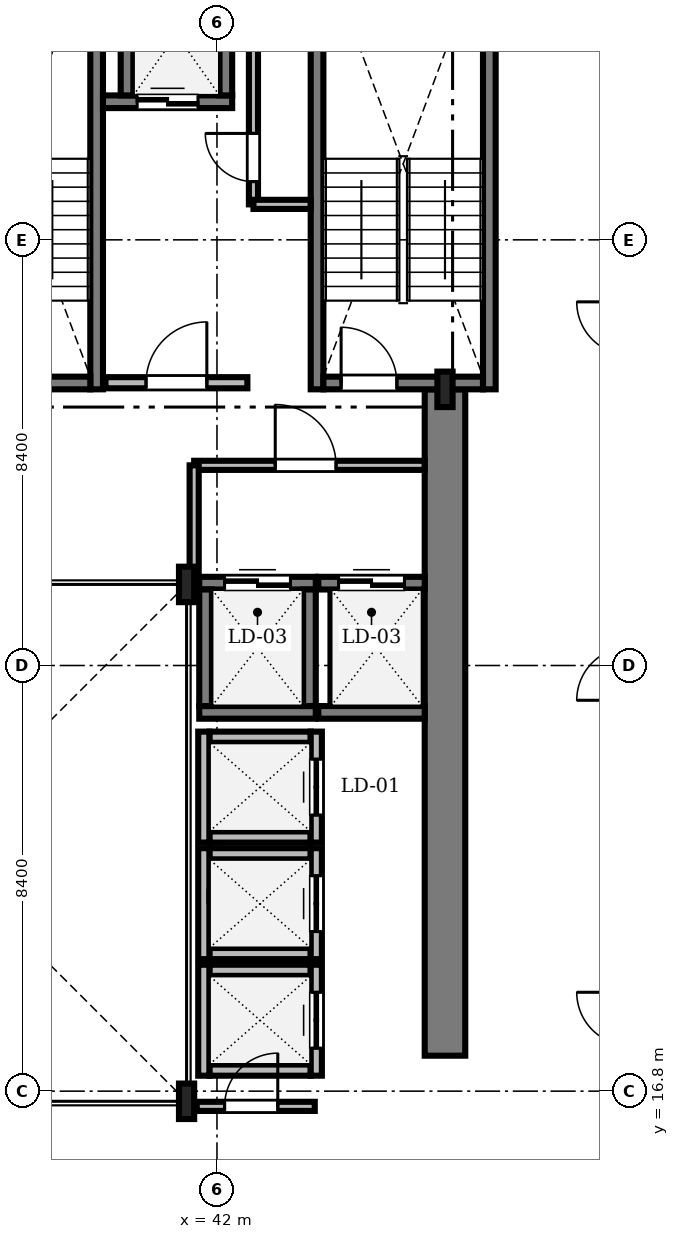
"""IFC4 building model, lengths in metres.
Left out: names, types, materials, properties, quantities, classifications, styles, units other than length and angle.
Written with IfcOpenShell. Run it as: python <this file> out.ifc"""

import sys

from ifc_helpers import new_model, si_unit, direction, frame, frame_2d, origin, origin_2d, place, context, subcontext, project, spatial, rectangle, i_section, extrude, source, transform, mapped, element, fill, save


model = new_model("IFC4")
c1 = context("Model", 3, precision=1e-05, world=origin(), true_north=direction((0.0, 1.0)))
c2 = subcontext(c1, "Body", "Model", "MODEL_VIEW")
j1 = project(units=[si_unit("LENGTHUNIT", "METRE"), si_unit("PLANEANGLEUNIT", "RADIAN")], contexts=[c1])
p1 = place(None, origin())
s1 = spatial("IfcSite", under=j1, at=p1, CompositionType="ELEMENT")
p2 = place(p1, origin())
s2 = spatial("IfcBuilding", under=s1, at=p2, CompositionType="ELEMENT")
p3 = place(p2, frame((0.0, 0.0, 226.05)))
s3 = spatial("IfcBuildingStorey", under=s2, at=p3, CompositionType="ELEMENT", Elevation=226.05)
m1 = source(origin(), c2, "Body", "SweptSolid", [
    extrude(rectangle(XDim=13.15, YDim=0.8, at=frame_2d((6.575, 0.0))), origin(), (0.0, 0.0, 1.0), 3.53),
])
p4 = place(p3, frame((46.5, 17.5, 0.0), z_axis=(0.0, 0.0, 1.0), x_axis=(0.0, 1.0, 0.0)))
e1 = element("IfcWall", 1, at=p4, inside=s3, PredefinedType="SHEAR", context=c2, shape_type="MappedRepresentation", body=[
    mapped(m1, transform((0.0, 0.0, 0.0), scale=1.0)),
])
m2 = source(origin(), c2, "Body", "SweptSolid", [
    extrude(i_section(OverallWidth=0.3, OverallDepth=0.7, WebThickness=0.017, FlangeThickness=0.032, FilletRadius=0.027, at=origin_2d()), origin(), (0.0, 0.0, 1.0), 3.53),
])
for number, where, z_axis, x_axis in (
    (2, (41.4, 16.6, 0.0), (0.0, 0.0, 1.0), (1.0, 0.0, 0.0)),
    (3, (41.4, 26.8, 0.0), (0.0, 0.0, 1.0), (1.0, 0.0, 0.0)),
    (4, (46.5, 30.65, 0.0), (0.0, 0.0, 1.0), (1.0, 0.0, 0.0)),
):
    element("IfcColumn", number, at=place(p3, frame(where, z_axis=z_axis, x_axis=x_axis)), inside=s3, PredefinedType="COLUMN", context=c2, shape_type="MappedRepresentation", body=[
        mapped(m2, transform((0.0, 0.0, 0.0), scale=1.0)),
    ])
m3 = source(origin(), c2, "Body", "SweptSolid", [
    extrude(rectangle(XDim=9.25, YDim=0.25, at=frame_2d((4.625, 0.0))), origin(), (0.0, 0.0, 1.0), 3.55),
])
p5 = place(p3, frame((39.625, 30.65, 0.0), z_axis=(0.0, 0.0, 1.0), x_axis=(0.0, 1.0, 0.0)))
e5 = element("IfcWall", 5, at=p5, inside=s3, PredefinedType="SOLIDWALL", context=c2, shape_type="MappedRepresentation", body=[
    mapped(m3, transform((0.0, 0.0, 0.0), scale=1.0)),
])
m4 = source(origin(), c2, "Body", "SweptSolid", [
    extrude(rectangle(XDim=3.15, YDim=0.25, at=frame_2d((1.575, 0.0))), origin(), (0.0, 0.0, 1.0), 3.55),
])
p6 = place(p3, frame((36.35, 30.775, 0.0), z_axis=(0.0, 0.0, 1.0), x_axis=(1.0, 0.0, 0.0)))
e6 = element("IfcWall", 6, at=p6, inside=s3, PredefinedType="SOLIDWALL", context=c2, shape_type="MappedRepresentation", body=[
    mapped(m4, transform((0.0, 0.0, 0.0), scale=1.0)),
])
m5 = source(origin(), c2, "Body", "SweptSolid", [
    extrude(rectangle(XDim=1.1, YDim=2.2, at=frame_2d((0.55, 1.1))), frame((0.0, 0.135, 0.0), z_axis=(0.0, -1.0, 0.0), x_axis=(1.0, 0.0, 0.0)), (0.0, 0.0, 1.0), 0.27),
])
p7 = place(p6, frame((0.35, 0.0, 0.0)))
e7 = element("IfcOpeningElement", 7, at=p7, cuts=e6, PredefinedType="OPENING", context=c2, shape_type="MappedRepresentation", body=[
    mapped(m5, transform((0.0, 0.0, 0.0), scale=1.0)),
])
for number, where, z_axis, x_axis in (
    (8, (43.975, 30.65, 0.0), (0.0, 0.0, 1.0), (0.0, 1.0, 0.0)),
    (9, (47.375, 30.65, 0.0), (0.0, 0.0, 1.0), (0.0, 1.0, 0.0)),
):
    element("IfcWall", number, at=place(p3, frame(where, z_axis=z_axis, x_axis=x_axis)), inside=s3, PredefinedType="SOLIDWALL", context=c2, shape_type="MappedRepresentation", body=[
        mapped(m3, transform((0.0, 0.0, 0.0), scale=1.0)),
    ])
p8 = place(p3, frame((44.1, 30.775, 0.0), z_axis=(0.0, 0.0, 1.0), x_axis=(1.0, 0.0, 0.0)))
e10 = element("IfcWall", 10, at=p8, inside=s3, PredefinedType="SOLIDWALL", context=c2, shape_type="MappedRepresentation", body=[
    mapped(m4, transform((0.0, 0.0, 0.0), scale=1.0)),
])
p9 = place(p8, frame((0.35, 0.0, 0.0)))
e11 = element("IfcOpeningElement", 11, at=p9, cuts=e10, PredefinedType="OPENING", context=c2, shape_type="MappedRepresentation", body=[
    mapped(m5, transform((0.0, 0.0, 0.0), scale=1.0)),
])
m6 = source(origin(), c2, "Body", "SweptSolid", [
    extrude(rectangle(XDim=2.8, YDim=0.22, at=frame_2d((1.4, 0.0))), origin(), (0.0, 0.0, 1.0), 3.53),
])
p10 = place(p3, frame((39.8, 30.78, 0.0), z_axis=(0.0, 0.0, 1.0), x_axis=(1.0, 0.0, 0.0)))
e12 = element("IfcWall", 12, at=p10, inside=s3, PredefinedType="SOLIDWALL", context=c2, shape_type="MappedRepresentation", body=[
    mapped(m6, transform((0.0, 0.0, 0.0), scale=1.0)),
])
m7 = source(origin(), c2, "Body", "SweptSolid", [
    extrude(rectangle(XDim=1.2, YDim=2.2, at=frame_2d((0.6, 1.1))), frame((0.0, 0.12, 0.0), z_axis=(0.0, -1.0, 0.0), x_axis=(1.0, 0.0, 0.0)), (0.0, 0.0, 1.0), 0.24),
])
p11 = place(p10, frame((0.8, 0.0, 0.0)))
e13 = element("IfcOpeningElement", 13, at=p11, cuts=e12, PredefinedType="OPENING", context=c2, shape_type="MappedRepresentation", body=[
    mapped(m7, transform((0.0, 0.0, 0.0), scale=1.0)),
])
m8 = source(origin(), c2, "Body", "SweptSolid", [
    extrude(rectangle(XDim=2.55, YDim=0.25, at=frame_2d((1.275, 0.0))), origin(), (0.0, 0.0, 1.0), 3.53),
])
p12 = place(p3, frame((39.75, 36.325, 0.0), z_axis=(0.0, 0.0, 1.0), x_axis=(1.0, 0.0, 0.0)))
e14 = element("IfcWall", 14, at=p12, inside=s3, PredefinedType="SOLIDWALL", context=c2, shape_type="MappedRepresentation", body=[
    mapped(m8, transform((0.0, 0.0, 0.0), scale=1.0)),
])
m9 = source(origin(), c2, "Body", "SweptSolid", [
    extrude(rectangle(XDim=1.2, YDim=2.25, at=frame_2d((0.6, 1.125))), frame((0.0, 0.135, 0.0), z_axis=(0.0, -1.0, 0.0), x_axis=(1.0, 0.0, 0.0)), (0.0, 0.0, 1.0), 0.27),
])
p13 = place(p12, frame((0.675, 0.0, 0.0)))
e15 = element("IfcOpeningElement", 15, at=p13, cuts=e14, PredefinedType="OPENING", context=c2, shape_type="MappedRepresentation", body=[
    mapped(m9, transform((0.0, 0.0, 0.0), scale=1.0)),
])
m10 = source(origin(), c2, "Body", "SweptSolid", [
    extrude(rectangle(XDim=2.4, YDim=0.25, at=frame_2d((1.2, 0.0))), origin(), (0.0, 0.0, 1.0), 3.53),
])
for number, where, z_axis, x_axis in (
    (16, (40.225, 36.45, 0.0), (0.0, 0.0, 1.0), (0.0, 1.0, 0.0)),
    (17, (42.175, 36.45, 0.0), (0.0, 0.0, 1.0), (0.0, 1.0, 0.0)),
):
    element("IfcWall", number, at=place(p3, frame(where, z_axis=z_axis, x_axis=x_axis)), inside=s3, PredefinedType="SOLIDWALL", context=c2, shape_type="MappedRepresentation", body=[
        mapped(m10, transform((0.0, 0.0, 0.0), scale=1.0)),
    ])
m11 = source(origin(), c2, "Body", "SweptSolid", [
    extrude(rectangle(XDim=2.0, YDim=0.22, at=frame_2d((1.0, 0.0))), origin(), (0.0, 0.0, 1.0), 3.53),
])
for number, where, z_axis, x_axis in (
    (18, (41.85, 21.815, 0.0), (0.0, 0.0, 1.0), (1.0, 0.0, 0.0)),
    (19, (41.85, 23.785, 0.0), (0.0, 0.0, 1.0), (1.0, 0.0, 0.0)),
):
    element("IfcWall", number, at=place(p3, frame(where, z_axis=z_axis, x_axis=x_axis)), inside=s3, PredefinedType="SOLIDWALL", context=c2, shape_type="MappedRepresentation", body=[
        mapped(m11, transform((0.0, 0.0, 0.0), scale=1.0)),
    ])
m12 = source(origin(), c2, "Body", "SweptSolid", [
    extrude(rectangle(XDim=2.19, YDim=0.22, at=frame_2d((1.095, 0.0))), origin(), (0.0, 0.0, 1.0), 3.53),
])
p14 = place(p3, frame((41.74, 21.705, 0.0), z_axis=(0.0, 0.0, 1.0), x_axis=(0.0, 1.0, 0.0)))
e20 = element("IfcWall", 20, at=p14, inside=s3, PredefinedType="SOLIDWALL", context=c2, shape_type="MappedRepresentation", body=[
    mapped(m12, transform((0.0, 0.0, 0.0), scale=1.0)),
])
p15 = place(p3, frame((43.96, 21.705, 0.0), z_axis=(0.0, 0.0, 1.0), x_axis=(0.0, 1.0, 0.0)))
e21 = element("IfcWall", 21, at=p15, inside=s3, PredefinedType="SOLIDWALL", context=c2, shape_type="MappedRepresentation", body=[
    mapped(m12, transform((0.0, 0.0, 0.0), scale=1.0)),
])
m13 = source(origin(), c2, "Body", "SweptSolid", [
    extrude(rectangle(XDim=1.1, YDim=2.2, at=frame_2d((0.55, 1.1))), frame((0.0, 0.12, 0.0), z_axis=(0.0, -1.0, 0.0), x_axis=(1.0, 0.0, 0.0)), (0.0, 0.0, 1.0), 0.24),
])
p16 = place(p15, frame((0.545, 0.0, 0.0)))
e22 = element("IfcOpeningElement", 22, at=p16, cuts=e21, PredefinedType="OPENING", context=c2, shape_type="MappedRepresentation", body=[
    mapped(m13, transform((0.0, 0.0, 0.0), scale=1.0)),
])
for number, where, z_axis, x_axis in (
    (23, (41.85, 19.515, 0.0), (0.0, 0.0, 1.0), (1.0, 0.0, 0.0)),
    (24, (41.85, 21.485, 0.0), (0.0, 0.0, 1.0), (1.0, 0.0, 0.0)),
):
    element("IfcWall", number, at=place(p3, frame(where, z_axis=z_axis, x_axis=x_axis)), inside=s3, PredefinedType="SOLIDWALL", context=c2, shape_type="MappedRepresentation", body=[
        mapped(m11, transform((0.0, 0.0, 0.0), scale=1.0)),
    ])
p17 = place(p3, frame((41.74, 19.405, 0.0), z_axis=(0.0, 0.0, 1.0), x_axis=(0.0, 1.0, 0.0)))
e25 = element("IfcWall", 25, at=p17, inside=s3, PredefinedType="SOLIDWALL", context=c2, shape_type="MappedRepresentation", body=[
    mapped(m12, transform((0.0, 0.0, 0.0), scale=1.0)),
])
p18 = place(p3, frame((43.96, 19.405, 0.0), z_axis=(0.0, 0.0, 1.0), x_axis=(0.0, 1.0, 0.0)))
e26 = element("IfcWall", 26, at=p18, inside=s3, PredefinedType="SOLIDWALL", context=c2, shape_type="MappedRepresentation", body=[
    mapped(m12, transform((0.0, 0.0, 0.0), scale=1.0)),
])
p19 = place(p18, frame((0.545, 0.0, 0.0)))
e27 = element("IfcOpeningElement", 27, at=p19, cuts=e26, PredefinedType="OPENING", context=c2, shape_type="MappedRepresentation", body=[
    mapped(m13, transform((0.0, 0.0, 0.0), scale=1.0)),
])
for number, where, z_axis, x_axis in (
    (28, (41.85, 17.215, 0.0), (0.0, 0.0, 1.0), (1.0, 0.0, 0.0)),
    (29, (41.85, 19.185, 0.0), (0.0, 0.0, 1.0), (1.0, 0.0, 0.0)),
):
    element("IfcWall", number, at=place(p3, frame(where, z_axis=z_axis, x_axis=x_axis)), inside=s3, PredefinedType="SOLIDWALL", context=c2, shape_type="MappedRepresentation", body=[
        mapped(m11, transform((0.0, 0.0, 0.0), scale=1.0)),
    ])
p20 = place(p3, frame((41.74, 17.105, 0.0), z_axis=(0.0, 0.0, 1.0), x_axis=(0.0, 1.0, 0.0)))
e30 = element("IfcWall", 30, at=p20, inside=s3, PredefinedType="SOLIDWALL", context=c2, shape_type="MappedRepresentation", body=[
    mapped(m12, transform((0.0, 0.0, 0.0), scale=1.0)),
])
p21 = place(p3, frame((43.96, 17.105, 0.0), z_axis=(0.0, 0.0, 1.0), x_axis=(0.0, 1.0, 0.0)))
e31 = element("IfcWall", 31, at=p21, inside=s3, PredefinedType="SOLIDWALL", context=c2, shape_type="MappedRepresentation", body=[
    mapped(m12, transform((0.0, 0.0, 0.0), scale=1.0)),
])
p22 = place(p21, frame((0.545, 0.0, 0.0)))
e32 = element("IfcOpeningElement", 32, at=p22, cuts=e31, PredefinedType="OPENING", context=c2, shape_type="MappedRepresentation", body=[
    mapped(m13, transform((0.0, 0.0, 0.0), scale=1.0)),
])
m14 = source(origin(), c2, "Body", "SweptSolid", [
    extrude(rectangle(XDim=2.3, YDim=0.25, at=frame_2d((1.15, 0.0))), origin(), (0.0, 0.0, 1.0), 3.53),
])
p23 = place(p3, frame((41.65, 24.275, 0.0), z_axis=(0.0, 0.0, 1.0), x_axis=(1.0, 0.0, 0.0)))
e33 = element("IfcWall", 33, at=p23, inside=s3, PredefinedType="SOLIDWALL", context=c2, shape_type="MappedRepresentation", body=[
    mapped(m14, transform((0.0, 0.0, 0.0), scale=1.0)),
])
p24 = place(p3, frame((41.65, 26.825, 0.0), z_axis=(0.0, 0.0, 1.0), x_axis=(1.0, 0.0, 0.0)))
e34 = element("IfcWall", 34, at=p24, inside=s3, PredefinedType="SOLIDWALL", context=c2, shape_type="MappedRepresentation", body=[
    mapped(m14, transform((0.0, 0.0, 0.0), scale=1.0)),
])
m15 = source(origin(), c2, "Body", "SweptSolid", [
    extrude(rectangle(XDim=1.3, YDim=2.3, at=frame_2d((0.65, 1.15))), frame((0.0, 0.135, 0.0), z_axis=(0.0, -1.0, 0.0), x_axis=(1.0, 0.0, 0.0)), (0.0, 0.0, 1.0), 0.27),
])
p25 = place(p24, frame((0.5, 0.0, 0.0)))
e35 = element("IfcOpeningElement", 35, at=p25, cuts=e34, PredefinedType="OPENING", context=c2, shape_type="MappedRepresentation", body=[
    mapped(m15, transform((0.0, 0.0, 0.0), scale=1.0)),
])
for number, where, z_axis, x_axis in (
    (36, (41.775, 24.4, 0.0), (0.0, 0.0, 1.0), (0.0, 1.0, 0.0)),
    (37, (43.825, 24.4, 0.0), (0.0, 0.0, 1.0), (0.0, 1.0, 0.0)),
):
    element("IfcWall", number, at=place(p3, frame(where, z_axis=z_axis, x_axis=x_axis)), inside=s3, PredefinedType="SOLIDWALL", context=c2, shape_type="MappedRepresentation", body=[
        mapped(m14, transform((0.0, 0.0, 0.0), scale=1.0)),
    ])
m16 = source(origin(), c2, "Body", "SweptSolid", [
    extrude(rectangle(XDim=2.1, YDim=0.25, at=frame_2d((1.05, 0.0))), origin(), (0.0, 0.0, 1.0), 3.53),
])
p26 = place(p3, frame((44.0, 24.275, 0.0), z_axis=(0.0, 0.0, 1.0), x_axis=(1.0, 0.0, 0.0)))
e38 = element("IfcWall", 38, at=p26, inside=s3, PredefinedType="SOLIDWALL", context=c2, shape_type="MappedRepresentation", body=[
    mapped(m16, transform((0.0, 0.0, 0.0), scale=1.0)),
])
p27 = place(p3, frame((44.0, 26.825, 0.0), z_axis=(0.0, 0.0, 1.0), x_axis=(1.0, 0.0, 0.0)))
e39 = element("IfcWall", 39, at=p27, inside=s3, PredefinedType="SOLIDWALL", context=c2, shape_type="MappedRepresentation", body=[
    mapped(m16, transform((0.0, 0.0, 0.0), scale=1.0)),
])
p28 = place(p27, frame((0.4, 0.0, 0.0)))
e40 = element("IfcOpeningElement", 40, at=p28, cuts=e39, PredefinedType="OPENING", context=c2, shape_type="MappedRepresentation", body=[
    mapped(m15, transform((0.0, 0.0, 0.0), scale=1.0)),
])
m17 = source(origin(), c2, "Body", "SweptSolid", [
    extrude(rectangle(XDim=4.95, YDim=0.18, at=frame_2d((2.475, 0.0))), origin(), (0.0, 0.0, 1.0), 3.53),
])
p29 = place(p3, frame((42.72, 34.3, 0.0), z_axis=(0.0, 0.0, 1.0), x_axis=(0.0, 1.0, 0.0)))
e41 = element("IfcWall", 41, at=p29, inside=s3, PredefinedType="PARTITIONING", context=c2, shape_type="MappedRepresentation", body=[
    mapped(m17, transform((0.0, 0.0, 0.0), scale=1.0)),
])
m18 = source(origin(), c2, "Body", "SweptSolid", [
    extrude(rectangle(XDim=0.95, YDim=2.15, at=frame_2d((0.475, 1.075))), frame((0.0, 0.1, 0.0), z_axis=(0.0, -1.0, 0.0), x_axis=(1.0, 0.0, 0.0)), (0.0, 0.0, 1.0), 0.2),
])
p30 = place(p29, frame((0.45, 0.0, 0.0)))
e42 = element("IfcOpeningElement", 42, at=p30, cuts=e41, PredefinedType="OPENING", context=c2, shape_type="MappedRepresentation", body=[
    mapped(m18, transform((0.0, 0.0, 0.0), scale=1.0)),
])
m19 = source(origin(), c2, "Body", "SweptSolid", [
    extrude(rectangle(XDim=4.548, YDim=0.18, at=frame_2d((2.274, 0.0))), origin(), (0.0, 0.0, 1.0), 3.162),
])
p31 = place(p3, frame((41.55, 29.15, 0.0), z_axis=(0.0, 0.0, 1.0), x_axis=(1.0, 0.0, 0.0)))
e43 = element("IfcWall", 43, at=p31, inside=s3, PredefinedType="PARTITIONING", context=c2, shape_type="MappedRepresentation", body=[
    mapped(m19, transform((0.0, 0.0, 0.0), scale=1.0)),
])
m20 = source(origin(), c2, "Body", "SweptSolid", [
    extrude(rectangle(XDim=1.2, YDim=2.2, at=frame_2d((0.6, 1.1))), frame((0.0, 0.1, 0.0), z_axis=(0.0, -1.0, 0.0), x_axis=(1.0, 0.0, 0.0)), (0.0, 0.0, 1.0), 0.2),
])
p32 = place(p31, frame((1.6, 0.0, 0.0)))
e44 = element("IfcOpeningElement", 44, at=p32, cuts=e43, PredefinedType="OPENING", context=c2, shape_type="MappedRepresentation", body=[
    mapped(m20, transform((0.0, 0.0, 0.0), scale=1.0)),
])
m21 = source(origin(), c2, "Body", "SweptSolid", [
    extrude(rectangle(XDim=2.33, YDim=0.18, at=frame_2d((1.165, 0.0))), origin(), (0.0, 0.0, 1.0), 2.972),
])
p33 = place(p3, frame((41.6, 16.5, 0.0), z_axis=(0.0, 0.0, 1.0), x_axis=(1.0, 0.0, 0.0)))
e45 = element("IfcWall", 45, at=p33, inside=s3, PredefinedType="PARTITIONING", context=c2, shape_type="MappedRepresentation", body=[
    mapped(m21, transform((0.0, 0.0, 0.0), scale=1.0)),
])
m22 = source(origin(), c2, "Body", "SweptSolid", [
    extrude(rectangle(XDim=1.05, YDim=2.2, at=frame_2d((0.525, 1.1))), frame((0.0, 0.1, 0.0), z_axis=(0.0, -1.0, 0.0), x_axis=(1.0, 0.0, 0.0)), (0.0, 0.0, 1.0), 0.2),
])
p34 = place(p33, frame((0.55, 0.0, 0.0)))
e46 = element("IfcOpeningElement", 46, at=p34, cuts=e45, PredefinedType="OPENING", context=c2, shape_type="MappedRepresentation", body=[
    mapped(m22, transform((0.0, 0.0, 0.0), scale=1.0)),
])
m23 = source(origin(), c2, "Body", "SweptSolid", [
    extrude(rectangle(XDim=2.35, YDim=0.18, at=frame_2d((1.175, 0.0))), origin(), (0.0, 0.0, 1.0), 2.972),
])
p35 = place(p3, frame((41.55, 26.8, 0.0), z_axis=(0.0, 0.0, 1.0), x_axis=(0.0, 1.0, 0.0)))
e47 = element("IfcWall", 47, at=p35, inside=s3, PredefinedType="PARTITIONING", context=c2, shape_type="MappedRepresentation", body=[
    mapped(m23, transform((0.0, 0.0, 0.0), scale=1.0)),
])
m24 = source(origin(), c2, "Body", "SweptSolid", [
    extrude(rectangle(XDim=1.858, YDim=0.18, at=frame_2d((0.929, 0.0))), origin(), (0.0, 0.0, 1.0), 3.53),
])
p36 = place(p3, frame((41.852, 20.65, 0.0), z_axis=(0.0, 0.0, 1.0), x_axis=(1.0, 0.0, 0.0)))
e48 = element("IfcWall", 48, at=p36, inside=s3, PredefinedType="PARTITIONING", context=c2, shape_type="MappedRepresentation", body=[
    mapped(m24, transform((0.0, 0.0, 0.0), scale=1.0)),
])
m25 = source(origin(), c2, "Body", "SweptSolid", [
    extrude(rectangle(XDim=1.128, YDim=0.18, at=frame_2d((0.564, 0.0))), origin(), (0.0, 0.0, 1.0), 3.53),
])
p37 = place(p3, frame((42.72, 34.3, 0.0), z_axis=(0.0, 0.0, 1.0), x_axis=(1.0, 0.0, 0.0)))
e49 = element("IfcWall", 49, at=p37, inside=s3, PredefinedType="PARTITIONING", context=c2, shape_type="MappedRepresentation", body=[
    mapped(m25, transform((0.0, 0.0, 0.0), scale=1.0)),
])
m26 = source(origin(), c2, "Body", "SweptSolid", [
    extrude(rectangle(XDim=1.1, YDim=2.2, at=frame_2d((0.55, 1.1))), frame((0.0, 0.025, 0.0), z_axis=(0.0, -1.0, 0.0), x_axis=(1.0, 0.0, 0.0)), (0.0, 0.0, 1.0), 0.05),
])
p38 = place(p9, origin())
e50 = element("IfcDoor", 50, at=p38, inside=s3, OperationType="SINGLE_SWING_LEFT", PredefinedType="DOOR", context=c2, shape_type="MappedRepresentation", body=[
    mapped(m26, transform((0.0, 0.0, 0.0), scale=1.0)),
])
fill(e11, e50)
m27 = source(origin(), c2, "Body", "SweptSolid", [
    extrude(rectangle(XDim=1.2, YDim=2.2, at=frame_2d((0.6, 1.1))), frame((0.0, 0.025, 0.0), z_axis=(0.0, -1.0, 0.0), x_axis=(1.0, 0.0, 0.0)), (0.0, 0.0, 1.0), 0.05),
])
p39 = place(p11, origin())
e51 = element("IfcDoor", 51, at=p39, inside=s3, OperationType="SINGLE_SWING_RIGHT", PredefinedType="DOOR", context=c2, shape_type="MappedRepresentation", body=[
    mapped(m27, transform((0.0, 0.0, 0.0), scale=1.0)),
])
fill(e13, e51)
m28 = source(origin(), c2, "Body", "SweptSolid", [
    extrude(rectangle(XDim=1.2, YDim=2.25, at=frame_2d((0.6, 1.125))), frame((0.0, 0.025, 0.0), z_axis=(0.0, -1.0, 0.0), x_axis=(1.0, 0.0, 0.0)), (0.0, 0.0, 1.0), 0.05),
])
p40 = place(p13, origin())
e52 = element("IfcDoor", 52, at=p40, inside=s3, OperationType="DOUBLE_DOOR_SLIDING", PredefinedType="DOOR", context=c2, shape_type="MappedRepresentation", body=[
    mapped(m28, transform((0.0, 0.0, 0.0), scale=1.0)),
])
fill(e15, e52)
p41 = place(p16, origin())
e53 = element("IfcDoor", 53, at=p41, inside=s3, OperationType="DOUBLE_DOOR_SLIDING", PredefinedType="DOOR", context=c2, shape_type="MappedRepresentation", body=[
    mapped(m26, transform((0.0, 0.0, 0.0), scale=1.0)),
])
fill(e22, e53)
p42 = place(p19, origin())
e54 = element("IfcDoor", 54, at=p42, inside=s3, OperationType="DOUBLE_DOOR_SLIDING", PredefinedType="DOOR", context=c2, shape_type="MappedRepresentation", body=[
    mapped(m26, transform((0.0, 0.0, 0.0), scale=1.0)),
])
fill(e27, e54)
p43 = place(p22, origin())
e55 = element("IfcDoor", 55, at=p43, inside=s3, OperationType="DOUBLE_DOOR_SLIDING", PredefinedType="DOOR", context=c2, shape_type="MappedRepresentation", body=[
    mapped(m26, transform((0.0, 0.0, 0.0), scale=1.0)),
])
fill(e32, e55)
m29 = source(origin(), c2, "Body", "SweptSolid", [
    extrude(rectangle(XDim=1.3, YDim=2.3, at=frame_2d((0.65, 1.15))), frame((0.0, 0.025, 0.0), z_axis=(0.0, -1.0, 0.0), x_axis=(1.0, 0.0, 0.0)), (0.0, 0.0, 1.0), 0.05),
])
p44 = place(p25, origin())
e56 = element("IfcDoor", 56, at=p44, inside=s3, OperationType="DOUBLE_DOOR_SLIDING", PredefinedType="DOOR", context=c2, shape_type="MappedRepresentation", body=[
    mapped(m29, transform((0.0, 0.0, 0.0), scale=1.0)),
])
fill(e35, e56)
p45 = place(p28, origin())
e57 = element("IfcDoor", 57, at=p45, inside=s3, OperationType="DOUBLE_DOOR_SLIDING", PredefinedType="DOOR", context=c2, shape_type="MappedRepresentation", body=[
    mapped(m29, transform((0.0, 0.0, 0.0), scale=1.0)),
])
fill(e40, e57)
m30 = source(origin(), c2, "Body", "SweptSolid", [
    extrude(rectangle(XDim=0.95, YDim=2.15, at=frame_2d((0.475, 1.075))), frame((0.0, 0.025, 0.0), z_axis=(0.0, -1.0, 0.0), x_axis=(1.0, 0.0, 0.0)), (0.0, 0.0, 1.0), 0.05),
])
p46 = place(p30, origin())
e58 = element("IfcDoor", 58, at=p46, inside=s3, OperationType="SINGLE_SWING_RIGHT", PredefinedType="DOOR", context=c2, shape_type="MappedRepresentation", body=[
    mapped(m30, transform((0.0, 0.0, 0.0), scale=1.0)),
])
fill(e42, e58)
p47 = place(p32, origin())
e59 = element("IfcDoor", 59, at=p47, inside=s3, OperationType="SINGLE_SWING_LEFT", PredefinedType="DOOR", context=c2, shape_type="MappedRepresentation", body=[
    mapped(m27, transform((0.0, 0.0, 0.0), scale=1.0)),
])
fill(e44, e59)
m31 = source(origin(), c2, "Body", "SweptSolid", [
    extrude(rectangle(XDim=1.05, YDim=2.2, at=frame_2d((0.525, 1.1))), frame((0.0, 0.025, 0.0), z_axis=(0.0, -1.0, 0.0), x_axis=(1.0, 0.0, 0.0)), (0.0, 0.0, 1.0), 0.05),
])
p48 = place(p34, origin())
e60 = element("IfcDoor", 60, at=p48, inside=s3, OperationType="SINGLE_SWING_RIGHT", PredefinedType="DOOR", context=c2, shape_type="MappedRepresentation", body=[
    mapped(m31, transform((0.0, 0.0, 0.0), scale=1.0)),
])
fill(e46, e60)
save(model, sys.argv[1])
